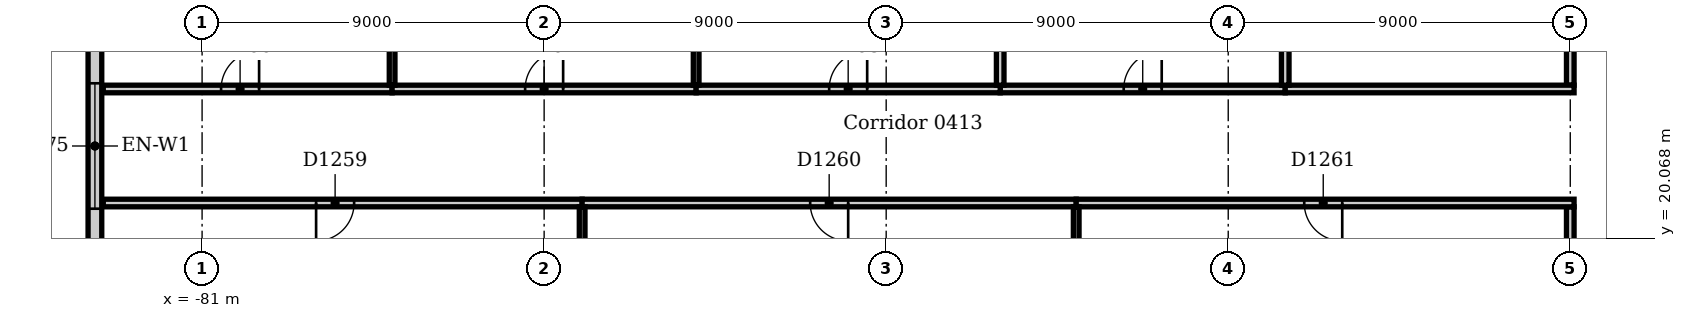
"""IFC4 building model, lengths in metres.
Left out: names, types, materials, properties, quantities, classifications, styles, units other than length and angle.
Written with IfcOpenShell. Run it as: python <this file> out.ifc"""

import sys

from ifc_helpers import new_model, si_unit, direction, frame, frame_2d, origin, place, context, subcontext, project, spatial, rectangle, extrude, element, fill, save


model = new_model("IFC4")
c1 = context("Model", 3, precision=1e-05, world=origin(), true_north=direction((0.0, 1.0)))
c2 = subcontext(c1, "Body", "Model", "MODEL_VIEW")
j1 = project(units=[si_unit("LENGTHUNIT", "METRE"), si_unit("PLANEANGLEUNIT", "RADIAN")], contexts=[c1])
p1 = place(None, origin())
s1 = spatial("IfcSite", under=j1, at=p1, CompositionType="ELEMENT")
p2 = place(p1, origin())
s2 = spatial("IfcBuilding", under=s1, at=p2, CompositionType="ELEMENT")
p3 = place(p2, frame((0.0, 0.0, 21.0)))
s3 = spatial("IfcBuildingStorey", under=s2, at=p3, CompositionType="ELEMENT", Elevation=21.0)
p4 = place(p3, frame((-83.82, 54.0, 0.0), z_axis=(0.0, 0.0, 1.0), x_axis=(0.0, -1.0, 0.0)))
e1 = element("IfcWall", 1, at=p4, inside=s3, PredefinedType="STANDARD", context=c2, shape_type="SweptSolid", body=[
    extrude(rectangle(XDim=63.0, YDim=0.36, at=frame_2d((31.5, 0.0))), origin(), (0.0, 0.0, 1.0), 4.85),
])
p5 = place(p4, frame((2.85, 0.0, 0.9)))
e2 = element("IfcOpeningElement", 2, at=p5, cuts=e1, PredefinedType="OPENING", context=c2, shape_type="SweptSolid", body=[
    extrude(rectangle(XDim=3.3, YDim=2.4, at=frame_2d((1.65, 1.2))), frame((0.0, 0.19, 0.0), z_axis=(0.0, -1.0, 0.0), x_axis=(1.0, 0.0, 0.0)), (0.0, 0.0, 1.0), 0.38),
])
p6 = place(p4, frame((7.35, 0.0, 0.9)))
e3 = element("IfcOpeningElement", 3, at=p6, cuts=e1, PredefinedType="OPENING", context=c2, shape_type="SweptSolid", body=[
    extrude(rectangle(XDim=3.3, YDim=2.4, at=frame_2d((1.65, 1.2))), frame((0.0, 0.19, 0.0), z_axis=(0.0, -1.0, 0.0), x_axis=(1.0, 0.0, 0.0)), (0.0, 0.0, 1.0), 0.38),
])
p7 = place(p4, frame((11.85, 0.0, 0.9)))
e4 = element("IfcOpeningElement", 4, at=p7, cuts=e1, PredefinedType="OPENING", context=c2, shape_type="SweptSolid", body=[
    extrude(rectangle(XDim=3.3, YDim=2.4, at=frame_2d((1.65, 1.2))), frame((0.0, 0.19, 0.0), z_axis=(0.0, -1.0, 0.0), x_axis=(1.0, 0.0, 0.0)), (0.0, 0.0, 1.0), 0.38),
])
p8 = place(p4, frame((16.35, 0.0, 0.9)))
e5 = element("IfcOpeningElement", 5, at=p8, cuts=e1, PredefinedType="OPENING", context=c2, shape_type="SweptSolid", body=[
    extrude(rectangle(XDim=3.3, YDim=2.4, at=frame_2d((1.65, 1.2))), frame((0.0, 0.19, 0.0), z_axis=(0.0, -1.0, 0.0), x_axis=(1.0, 0.0, 0.0)), (0.0, 0.0, 1.0), 0.38),
])
p9 = place(p4, frame((20.85, 0.0, 0.9)))
e6 = element("IfcOpeningElement", 6, at=p9, cuts=e1, PredefinedType="OPENING", context=c2, shape_type="SweptSolid", body=[
    extrude(rectangle(XDim=3.3, YDim=2.4, at=frame_2d((1.65, 1.2))), frame((0.0, 0.19, 0.0), z_axis=(0.0, -1.0, 0.0), x_axis=(1.0, 0.0, 0.0)), (0.0, 0.0, 1.0), 0.38),
])
p10 = place(p4, frame((25.35, 0.0, 0.9)))
e7 = element("IfcOpeningElement", 7, at=p10, cuts=e1, PredefinedType="OPENING", context=c2, shape_type="SweptSolid", body=[
    extrude(rectangle(XDim=3.3, YDim=2.4, at=frame_2d((1.65, 1.2))), frame((0.0, 0.19, 0.0), z_axis=(0.0, -1.0, 0.0), x_axis=(1.0, 0.0, 0.0)), (0.0, 0.0, 1.0), 0.38),
])
p11 = place(p4, frame((29.85, 0.0, 0.9)))
e8 = element("IfcOpeningElement", 8, at=p11, cuts=e1, PredefinedType="OPENING", context=c2, shape_type="SweptSolid", body=[
    extrude(rectangle(XDim=3.3, YDim=2.4, at=frame_2d((1.65, 1.2))), frame((0.0, 0.19, 0.0), z_axis=(0.0, -1.0, 0.0), x_axis=(1.0, 0.0, 0.0)), (0.0, 0.0, 1.0), 0.38),
])
p12 = place(p4, frame((34.35, 0.0, 0.9)))
e9 = element("IfcOpeningElement", 9, at=p12, cuts=e1, PredefinedType="OPENING", context=c2, shape_type="SweptSolid", body=[
    extrude(rectangle(XDim=3.3, YDim=2.4, at=frame_2d((1.65, 1.2))), frame((0.0, 0.19, 0.0), z_axis=(0.0, -1.0, 0.0), x_axis=(1.0, 0.0, 0.0)), (0.0, 0.0, 1.0), 0.38),
])
p13 = place(p4, frame((38.85, 0.0, 0.9)))
e10 = element("IfcOpeningElement", 10, at=p13, cuts=e1, PredefinedType="OPENING", context=c2, shape_type="SweptSolid", body=[
    extrude(rectangle(XDim=3.3, YDim=2.4, at=frame_2d((1.65, 1.2))), frame((0.0, 0.19, 0.0), z_axis=(0.0, -1.0, 0.0), x_axis=(1.0, 0.0, 0.0)), (0.0, 0.0, 1.0), 0.38),
])
p14 = place(p4, frame((43.35, 0.0, 0.9)))
e11 = element("IfcOpeningElement", 11, at=p14, cuts=e1, PredefinedType="OPENING", context=c2, shape_type="SweptSolid", body=[
    extrude(rectangle(XDim=3.3, YDim=2.4, at=frame_2d((1.65, 1.2))), frame((0.0, 0.19, 0.0), z_axis=(0.0, -1.0, 0.0), x_axis=(1.0, 0.0, 0.0)), (0.0, 0.0, 1.0), 0.38),
])
p15 = place(p4, frame((47.85, 0.0, 0.9)))
e12 = element("IfcOpeningElement", 12, at=p15, cuts=e1, PredefinedType="OPENING", context=c2, shape_type="SweptSolid", body=[
    extrude(rectangle(XDim=3.3, YDim=2.4, at=frame_2d((1.65, 1.2))), frame((0.0, 0.19, 0.0), z_axis=(0.0, -1.0, 0.0), x_axis=(1.0, 0.0, 0.0)), (0.0, 0.0, 1.0), 0.38),
])
p16 = place(p4, frame((52.35, 0.0, 0.9)))
e13 = element("IfcOpeningElement", 13, at=p16, cuts=e1, PredefinedType="OPENING", context=c2, shape_type="SweptSolid", body=[
    extrude(rectangle(XDim=3.3, YDim=2.4, at=frame_2d((1.65, 1.2))), frame((0.0, 0.19, 0.0), z_axis=(0.0, -1.0, 0.0), x_axis=(1.0, 0.0, 0.0)), (0.0, 0.0, 1.0), 0.38),
])
p17 = place(p4, frame((56.85, 0.0, 0.9)))
e14 = element("IfcOpeningElement", 14, at=p17, cuts=e1, PredefinedType="OPENING", context=c2, shape_type="SweptSolid", body=[
    extrude(rectangle(XDim=3.3, YDim=2.4, at=frame_2d((1.65, 1.2))), frame((0.0, 0.19, 0.0), z_axis=(0.0, -1.0, 0.0), x_axis=(1.0, 0.0, 0.0)), (0.0, 0.0, 1.0), 0.38),
])
for number, where, z_axis, x_axis in (
    (15, (-45.0, 24.1, 0.0), (0.0, 0.0, 1.0), (0.0, 1.0, 0.0)),
    (16, (-45.0, 18.42, 0.0), (0.0, 0.0, 1.0), (0.0, 1.0, 0.0)),
):
    element("IfcWall", number, at=place(p3, frame(where, z_axis=z_axis, x_axis=x_axis)), inside=s3, PredefinedType="PARTITIONING", context=c2, shape_type="SweptSolid", body=[
        extrude(rectangle(XDim=2.48, YDim=0.2, at=frame_2d((1.24, 0.0))), origin(), (0.0, 0.0, 1.0), 4.158),
    ])
p18 = place(p3, frame((-60.0, 24.0, 0.0), z_axis=(0.0, 0.0, 1.0), x_axis=(1.0, 0.0, 0.0)))
e17 = element("IfcWall", 17, at=p18, inside=s3, PredefinedType="PARTITIONING", context=c2, shape_type="SweptSolid", body=[
    extrude(rectangle(XDim=7.5, YDim=0.2, at=frame_2d((3.75, 0.0))), origin(), (0.0, 0.0, 1.0), 4.85),
])
p19 = place(p18, frame((3.25, 0.0, 0.0)))
e18 = element("IfcOpeningElement", 18, at=p19, cuts=e17, PredefinedType="OPENING", context=c2, shape_type="SweptSolid", body=[
    extrude(rectangle(XDim=1.0, YDim=2.1, at=frame_2d((0.5, 1.05))), frame((0.0, 0.11, 0.0), z_axis=(0.0, -1.0, 0.0), x_axis=(1.0, 0.0, 0.0)), (0.0, 0.0, 1.0), 0.22),
])
p20 = place(p3, frame((-52.5, 24.0, 0.0), z_axis=(0.0, 0.0, 1.0), x_axis=(1.0, 0.0, 0.0)))
e19 = element("IfcWall", 19, at=p20, inside=s3, PredefinedType="PARTITIONING", context=c2, shape_type="SweptSolid", body=[
    extrude(rectangle(XDim=7.6, YDim=0.2, at=frame_2d((3.8, 0.0))), origin(), (0.0, 0.0, 1.0), 4.85),
])
p21 = place(p3, frame((-83.6, 21.0, 0.0), z_axis=(0.0, 0.0, 1.0), x_axis=(1.0, 0.0, 0.0)))
e20 = element("IfcWall", 20, at=p21, inside=s3, PredefinedType="PARTITIONING", context=c2, shape_type="SweptSolid", body=[
    extrude(rectangle(XDim=12.6, YDim=0.2, at=frame_2d((6.3, 0.0))), origin(), (0.0, 0.0, 1.0), 4.7),
])
p22 = place(p21, frame((5.6, 0.0, 0.0)))
e21 = element("IfcOpeningElement", 21, at=p22, cuts=e20, PredefinedType="OPENING", context=c2, shape_type="SweptSolid", body=[
    extrude(rectangle(XDim=1.0, YDim=2.1, at=frame_2d((0.5, 1.05))), frame((0.0, 0.11, 0.0), z_axis=(0.0, -1.0, 0.0), x_axis=(1.0, 0.0, 0.0)), (0.0, 0.0, 1.0), 0.22),
])
p23 = place(p3, frame((-71.0, 21.0, 0.0), z_axis=(0.0, 0.0, 1.0), x_axis=(1.0, 0.0, 0.0)))
e22 = element("IfcWall", 22, at=p23, inside=s3, PredefinedType="PARTITIONING", context=c2, shape_type="SweptSolid", body=[
    extrude(rectangle(XDim=13.0, YDim=0.2, at=frame_2d((6.5, 0.0))), origin(), (0.0, 0.0, 1.0), 4.85),
])
p24 = place(p23, frame((6.0, 0.0, 0.0)))
e23 = element("IfcOpeningElement", 23, at=p24, cuts=e22, PredefinedType="OPENING", context=c2, shape_type="SweptSolid", body=[
    extrude(rectangle(XDim=1.0, YDim=2.1, at=frame_2d((0.5, 1.05))), frame((0.0, 0.11, 0.0), z_axis=(0.0, -1.0, 0.0), x_axis=(1.0, 0.0, 0.0)), (0.0, 0.0, 1.0), 0.22),
])
p25 = place(p3, frame((-58.0, 21.0, 0.0), z_axis=(0.0, 0.0, 1.0), x_axis=(1.0, 0.0, 0.0)))
e24 = element("IfcWall", 24, at=p25, inside=s3, PredefinedType="PARTITIONING", context=c2, shape_type="SweptSolid", body=[
    extrude(rectangle(XDim=13.1, YDim=0.2, at=frame_2d((6.55, 0.0))), origin(), (0.0, 0.0, 1.0), 4.85),
])
p26 = place(p25, frame((6.0, 0.0, 0.0)))
e25 = element("IfcOpeningElement", 25, at=p26, cuts=e24, PredefinedType="OPENING", context=c2, shape_type="SweptSolid", body=[
    extrude(rectangle(XDim=1.0, YDim=2.1, at=frame_2d((0.5, 1.05))), frame((0.0, 0.11, 0.0), z_axis=(0.0, -1.0, 0.0), x_axis=(1.0, 0.0, 0.0)), (0.0, 0.0, 1.0), 0.22),
])
p27 = place(p3, frame((-83.6, 24.0, 0.0), z_axis=(0.0, 0.0, 1.0), x_axis=(1.0, 0.0, 0.0)))
e26 = element("IfcWall", 26, at=p27, inside=s3, PredefinedType="PARTITIONING", context=c2, shape_type="SweptSolid", body=[
    extrude(rectangle(XDim=7.6, YDim=0.2, at=frame_2d((3.8, 0.0))), origin(), (0.0, 0.0, 1.0), 4.7),
])
p28 = place(p27, frame((3.1, 0.0, 0.0)))
e27 = element("IfcOpeningElement", 27, at=p28, cuts=e26, PredefinedType="OPENING", context=c2, shape_type="SweptSolid", body=[
    extrude(rectangle(XDim=1.0, YDim=2.1, at=frame_2d((0.5, 1.05))), frame((0.0, 0.11, 0.0), z_axis=(0.0, -1.0, 0.0), x_axis=(1.0, 0.0, 0.0)), (0.0, 0.0, 1.0), 0.22),
])
p29 = place(p3, frame((-76.0, 24.0, 0.0), z_axis=(0.0, 0.0, 1.0), x_axis=(1.0, 0.0, 0.0)))
e28 = element("IfcWall", 28, at=p29, inside=s3, PredefinedType="PARTITIONING", context=c2, shape_type="SweptSolid", body=[
    extrude(rectangle(XDim=8.0, YDim=0.2, at=frame_2d((4.0, 0.0))), origin(), (0.0, 0.0, 1.0), 4.7),
])
p30 = place(p29, frame((3.5, 0.0, 0.0)))
e29 = element("IfcOpeningElement", 29, at=p30, cuts=e28, PredefinedType="OPENING", context=c2, shape_type="SweptSolid", body=[
    extrude(rectangle(XDim=1.0, YDim=2.1, at=frame_2d((0.5, 1.05))), frame((0.0, 0.11, 0.0), z_axis=(0.0, -1.0, 0.0), x_axis=(1.0, 0.0, 0.0)), (0.0, 0.0, 1.0), 0.22),
])
p31 = place(p3, frame((-68.0, 24.0, 0.0), z_axis=(0.0, 0.0, 1.0), x_axis=(1.0, 0.0, 0.0)))
e30 = element("IfcWall", 30, at=p31, inside=s3, PredefinedType="PARTITIONING", context=c2, shape_type="SweptSolid", body=[
    extrude(rectangle(XDim=8.0, YDim=0.2, at=frame_2d((4.0, 0.0))), origin(), (0.0, 0.0, 1.0), 4.85),
])
p32 = place(p31, frame((3.5, 0.0, 0.0)))
e31 = element("IfcOpeningElement", 31, at=p32, cuts=e30, PredefinedType="OPENING", context=c2, shape_type="SweptSolid", body=[
    extrude(rectangle(XDim=1.0, YDim=2.1, at=frame_2d((0.5, 1.05))), frame((0.0, 0.11, 0.0), z_axis=(0.0, -1.0, 0.0), x_axis=(1.0, 0.0, 0.0)), (0.0, 0.0, 1.0), 0.22),
])
for number, where, z_axis, x_axis in (
    (32, (-52.5, 24.1, 0.0), (0.0, 0.0, 1.0), (0.0, 1.0, 0.0)),
    (33, (-60.0, 24.1, 0.0), (0.0, 0.0, 1.0), (0.0, 1.0, 0.0)),
):
    element("IfcWall", number, at=place(p3, frame(where, z_axis=z_axis, x_axis=x_axis)), inside=s3, PredefinedType="PARTITIONING", context=c2, shape_type="SweptSolid", body=[
        extrude(rectangle(XDim=5.15, YDim=0.2, at=frame_2d((2.575, 0.0))), origin(), (0.0, 0.0, 1.0), 4.85),
    ])
p33 = place(p3, frame((-71.0, 18.47, 0.0), z_axis=(0.0, 0.0, 1.0), x_axis=(0.0, 1.0, 0.0)))
e34 = element("IfcWall", 34, at=p33, inside=s3, PredefinedType="PARTITIONING", context=c2, shape_type="SweptSolid", body=[
    extrude(rectangle(XDim=2.43, YDim=0.15, at=frame_2d((1.215, 0.0))), origin(), (0.0, 0.0, 1.0), 4.25),
])
p34 = place(p3, frame((-58.0, 12.375, 0.0), z_axis=(0.0, 0.0, 1.0), x_axis=(0.0, 1.0, 0.0)))
e35 = element("IfcWall", 35, at=p34, inside=s3, PredefinedType="PARTITIONING", context=c2, shape_type="SweptSolid", body=[
    extrude(rectangle(XDim=8.525, YDim=0.15, at=frame_2d((4.263, 0.0))), origin(), (0.0, 0.0, 1.0), 4.85),
])
p35 = place(p3, frame((-76.0, 24.1, 0.0), z_axis=(0.0, 0.0, 1.0), x_axis=(0.0, 1.0, 0.0)))
e36 = element("IfcWall", 36, at=p35, inside=s3, PredefinedType="PARTITIONING", context=c2, shape_type="SweptSolid", body=[
    extrude(rectangle(XDim=17.45, YDim=0.15, at=frame_2d((8.725, 0.0))), origin(), (0.0, 0.0, 1.0), 4.7),
])
p36 = place(p3, frame((-68.0, 24.1, 0.0), z_axis=(0.0, 0.0, 1.0), x_axis=(0.0, 1.0, 0.0)))
e37 = element("IfcWall", 37, at=p36, inside=s3, PredefinedType="PARTITIONING", context=c2, shape_type="SweptSolid", body=[
    extrude(rectangle(XDim=17.45, YDim=0.15, at=frame_2d((8.725, 0.0))), origin(), (0.0, 0.0, 1.0), 4.85),
])
p37 = place(p11, origin())
e38 = element("IfcWindow", 38, at=p37, inside=s3, PartitioningType="SINGLE_PANEL", PredefinedType="WINDOW", context=c2, shape_type="SweptSolid", body=[
    extrude(rectangle(XDim=3.3, YDim=2.4, at=frame_2d((1.65, 1.2))), frame((0.0, 0.13, 0.0), z_axis=(0.0, -1.0, 0.0), x_axis=(1.0, 0.0, 0.0)), (0.0, 0.0, 1.0), 0.06),
])
fill(e8, e38)
p38 = place(p19, origin())
e39 = element("IfcDoor", 39, at=p38, inside=s3, OperationType="SINGLE_SWING_RIGHT", PredefinedType="DOOR", context=c2, shape_type="SweptSolid", body=[
    extrude(rectangle(XDim=1.0, YDim=2.1, at=frame_2d((0.5, 1.05))), frame((0.0, 0.025, 0.0), z_axis=(0.0, -1.0, 0.0), x_axis=(1.0, 0.0, 0.0)), (0.0, 0.0, 1.0), 0.05),
])
fill(e18, e39)
p39 = place(p22, frame((1.0, 0.0, 0.0), z_axis=(0.0, 0.0, 1.0), x_axis=(-1.0, 0.0, 0.0)))
e40 = element("IfcDoor", 40, at=p39, inside=s3, OperationType="SINGLE_SWING_RIGHT", PredefinedType="DOOR", context=c2, shape_type="SweptSolid", body=[
    extrude(rectangle(XDim=1.0, YDim=2.1, at=frame_2d((0.5, 1.05))), frame((0.0, 0.025, 0.0), z_axis=(0.0, -1.0, 0.0), x_axis=(1.0, 0.0, 0.0)), (0.0, 0.0, 1.0), 0.05),
])
fill(e21, e40)
p40 = place(p24, frame((1.0, 0.0, 0.0), z_axis=(0.0, 0.0, 1.0), x_axis=(-1.0, 0.0, 0.0)))
e41 = element("IfcDoor", 41, at=p40, inside=s3, OperationType="SINGLE_SWING_LEFT", PredefinedType="DOOR", context=c2, shape_type="SweptSolid", body=[
    extrude(rectangle(XDim=1.0, YDim=2.1, at=frame_2d((0.5, 1.05))), frame((0.0, 0.025, 0.0), z_axis=(0.0, -1.0, 0.0), x_axis=(1.0, 0.0, 0.0)), (0.0, 0.0, 1.0), 0.05),
])
fill(e23, e41)
p41 = place(p26, frame((1.0, 0.0, 0.0), z_axis=(0.0, 0.0, 1.0), x_axis=(-1.0, 0.0, 0.0)))
e42 = element("IfcDoor", 42, at=p41, inside=s3, OperationType="SINGLE_SWING_LEFT", PredefinedType="DOOR", context=c2, shape_type="SweptSolid", body=[
    extrude(rectangle(XDim=1.0, YDim=2.1, at=frame_2d((0.5, 1.05))), frame((0.0, 0.025, 0.0), z_axis=(0.0, -1.0, 0.0), x_axis=(1.0, 0.0, 0.0)), (0.0, 0.0, 1.0), 0.05),
])
fill(e25, e42)
p42 = place(p28, origin())
e43 = element("IfcDoor", 43, at=p42, inside=s3, OperationType="SINGLE_SWING_RIGHT", PredefinedType="DOOR", context=c2, shape_type="SweptSolid", body=[
    extrude(rectangle(XDim=1.0, YDim=2.1, at=frame_2d((0.5, 1.05))), frame((0.0, 0.025, 0.0), z_axis=(0.0, -1.0, 0.0), x_axis=(1.0, 0.0, 0.0)), (0.0, 0.0, 1.0), 0.05),
])
fill(e27, e43)
p43 = place(p30, origin())
e44 = element("IfcDoor", 44, at=p43, inside=s3, OperationType="SINGLE_SWING_RIGHT", PredefinedType="DOOR", context=c2, shape_type="SweptSolid", body=[
    extrude(rectangle(XDim=1.0, YDim=2.1, at=frame_2d((0.5, 1.05))), frame((0.0, 0.025, 0.0), z_axis=(0.0, -1.0, 0.0), x_axis=(1.0, 0.0, 0.0)), (0.0, 0.0, 1.0), 0.05),
])
fill(e29, e44)
p44 = place(p32, origin())
e45 = element("IfcDoor", 45, at=p44, inside=s3, OperationType="SINGLE_SWING_RIGHT", PredefinedType="DOOR", context=c2, shape_type="SweptSolid", body=[
    extrude(rectangle(XDim=1.0, YDim=2.1, at=frame_2d((0.5, 1.05))), frame((0.0, 0.025, 0.0), z_axis=(0.0, -1.0, 0.0), x_axis=(1.0, 0.0, 0.0)), (0.0, 0.0, 1.0), 0.05),
])
fill(e31, e45)
save(model, sys.argv[1])
